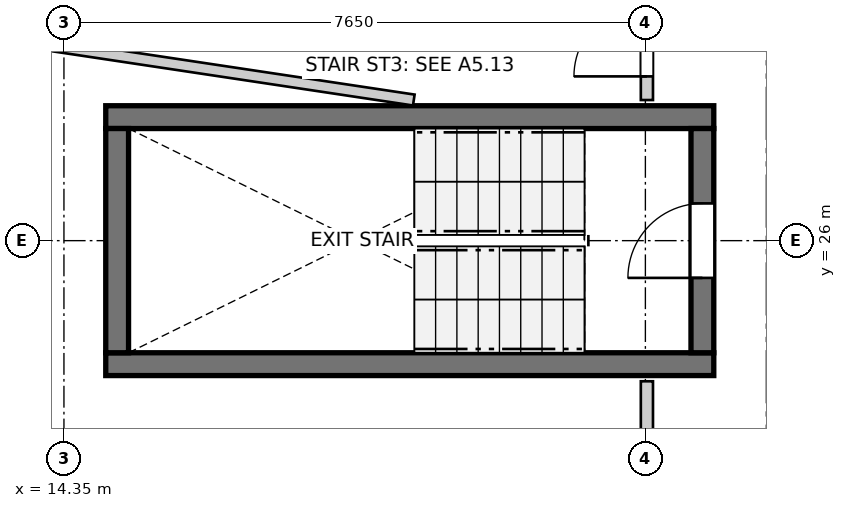
"""IFC4 building model, lengths in metres.
Left out: names, types, materials, properties, quantities, classifications, styles, units other than length and angle.
Written with IfcOpenShell. Run it as: python <this file> out.ifc"""

import sys

from ifc_helpers import new_model, si_unit, direction, frame, frame_2d, origin, place, context, subcontext, project, spatial, rectangle, extrude, source, transform, mapped, element, fill, save


model = new_model("IFC4")
c1 = context("Model", 3, precision=1e-05, world=origin(), true_north=direction((0.0, 1.0)))
c2 = subcontext(c1, "Body", "Model", "MODEL_VIEW")
j1 = project(units=[si_unit("LENGTHUNIT", "METRE"), si_unit("PLANEANGLEUNIT", "RADIAN")], contexts=[c1])
p1 = place(None, origin())
s1 = spatial("IfcSite", under=j1, at=p1, CompositionType="ELEMENT")
p2 = place(p1, origin())
s2 = spatial("IfcBuilding", under=s1, at=p2, CompositionType="ELEMENT")
p3 = place(p2, frame((0.0, 0.0, 27.0)))
s3 = spatial("IfcBuildingStorey", under=s2, at=p3, CompositionType="ELEMENT", Elevation=27.0)
for number, where, z_axis, x_axis in (
    (1, (14.9, 24.375, 0.0), (0.0, 0.0, 1.0), (1.0, 0.0, 0.0)),
    (2, (22.9, 27.625, 0.0), (0.0, 0.0, 1.0), (-1.0, 0.0, 0.0)),
):
    element("IfcWall", number, at=place(p3, frame(where, z_axis=z_axis, x_axis=x_axis)), inside=s3, PredefinedType="SHEAR", context=c2, shape_type="SweptSolid", body=[
        extrude(rectangle(XDim=8.0, YDim=0.3, at=frame_2d((4.0, 0.0))), origin(), (0.0, 0.0, 1.0), 2.935),
    ])
p4 = place(p3, frame((15.05, 27.475, 0.0), z_axis=(0.0, 0.0, 1.0), x_axis=(0.0, -1.0, 0.0)))
e3 = element("IfcWall", 3, at=p4, inside=s3, PredefinedType="SHEAR", context=c2, shape_type="SweptSolid", body=[
    extrude(rectangle(XDim=2.95, YDim=0.3, at=frame_2d((1.475, 0.0))), origin(), (0.0, 0.0, 1.0), 2.935),
])
p5 = place(p3, frame((22.75, 24.525, 0.0), z_axis=(0.0, 0.0, 1.0), x_axis=(0.0, 1.0, 0.0)))
e4 = element("IfcWall", 4, at=p5, inside=s3, PredefinedType="SHEAR", context=c2, shape_type="SweptSolid", body=[
    extrude(rectangle(XDim=2.95, YDim=0.3, at=frame_2d((1.475, 0.0))), origin(), (0.0, 0.0, 1.0), 2.935),
])
p6 = place(p5, frame((0.985, 0.0, 0.0)))
e5 = element("IfcOpeningElement", 5, at=p6, cuts=e4, PredefinedType="OPENING", context=c2, shape_type="SweptSolid", body=[
    extrude(rectangle(XDim=0.98, YDim=2.15, at=frame_2d((0.49, 1.075))), frame((0.0, 0.16, 0.0), z_axis=(0.0, -1.0, 0.0), x_axis=(1.0, 0.0, 0.0)), (0.0, 0.0, 1.0), 0.32),
])
p7 = place(p3, frame((22.02, 16.883, 0.0), z_axis=(0.0, 0.0, 1.0), x_axis=(0.0, 1.0, 0.0)))
e6 = element("IfcWall", 6, at=p7, inside=s3, PredefinedType="PARTITIONING", context=c2, shape_type="SweptSolid", body=[
    extrude(rectangle(XDim=7.267, YDim=0.16, at=frame_2d((3.633, 0.0))), origin(), (0.0, 0.0, 1.0), 2.935),
])
p8 = place(p7, frame((2.845, 0.0, 0.0)))
e7 = element("IfcOpeningElement", 7, at=p8, cuts=e6, PredefinedType="OPENING", context=c2, shape_type="SweptSolid", body=[
    extrude(rectangle(XDim=1.3, YDim=2.1, at=frame_2d((0.65, 1.05))), frame((0.0, 0.09, 0.0), z_axis=(0.0, -1.0, 0.0), x_axis=(1.0, 0.0, 0.0)), (0.0, 0.0, 1.0), 0.18),
])
p9 = place(p3, frame((22.02, 27.85, 0.0), z_axis=(0.0, 0.0, 1.0), x_axis=(0.0, 1.0, 0.0)))
e8 = element("IfcWall", 8, at=p9, inside=s3, PredefinedType="PARTITIONING", context=c2, shape_type="SweptSolid", body=[
    extrude(rectangle(XDim=1.539, YDim=0.16, at=frame_2d((0.77, 0.0))), origin(), (0.0, 0.0, 1.0), 2.935),
])
p10 = place(p9, frame((0.311, 0.0, 0.0)))
e9 = element("IfcOpeningElement", 9, at=p10, cuts=e8, PredefinedType="OPENING", context=c2, shape_type="SweptSolid", body=[
    extrude(rectangle(XDim=0.96, YDim=2.1, at=frame_2d((0.48, 1.05))), frame((0.0, 0.09, 0.0), z_axis=(0.0, -1.0, 0.0), x_axis=(1.0, 0.0, 0.0)), (0.0, 0.0, 1.0), 0.18),
])
p11 = place(p3, frame((5.242, 29.91, 0.0), z_axis=(0.0, 0.0, 1.0), x_axis=(0.988899381561, -0.148586719285, 0.0)))
e10 = element("IfcWall", 10, at=p11, inside=s3, PredefinedType="PARTITIONING", context=c2, shape_type="SweptSolid", body=[
    extrude(rectangle(XDim=13.864, YDim=0.145, at=frame_2d((6.932, 0.0))), origin(), (0.0, 0.0, 1.0), 2.935),
])
m1 = source(origin(), c2, "Body", "SweptSolid", [
    extrude(rectangle(XDim=0.98, YDim=2.15, at=frame_2d((0.49, 1.075))), frame((0.0, 0.025, 0.0), z_axis=(0.0, -1.0, 0.0), x_axis=(1.0, 0.0, 0.0)), (0.0, 0.0, 1.0), 0.05),
])
p12 = place(p6, origin())
e11 = element("IfcDoor", 11, at=p12, inside=s3, OperationType="SINGLE_SWING_LEFT", PredefinedType="DOOR", context=c2, shape_type="MappedRepresentation", body=[
    mapped(m1, transform((0.0, 0.0, 0.0), x_axis=(1.0, 0.0, 0.0), y_axis=(0.0, 1.0, 0.0), z_axis=(0.0, 0.0, 1.0), scale=1.0)),
])
fill(e5, e11)
m2 = source(origin(), c2, "Body", "SweptSolid", [
    extrude(rectangle(XDim=0.96, YDim=2.1, at=frame_2d((0.48, 1.05))), frame((0.0, 0.025, 0.0), z_axis=(0.0, -1.0, 0.0), x_axis=(1.0, 0.0, 0.0)), (0.0, 0.0, 1.0), 0.05),
])
p13 = place(p10, origin())
e12 = element("IfcDoor", 12, at=p13, inside=s3, OperationType="SINGLE_SWING_LEFT", PredefinedType="DOOR", context=c2, shape_type="MappedRepresentation", body=[
    mapped(m2, transform((0.0, 0.0, 0.0), x_axis=(1.0, 0.0, 0.0), y_axis=(0.0, 1.0, 0.0), z_axis=(0.0, 0.0, 1.0), scale=1.0)),
])
fill(e9, e12)
save(model, sys.argv[1])
